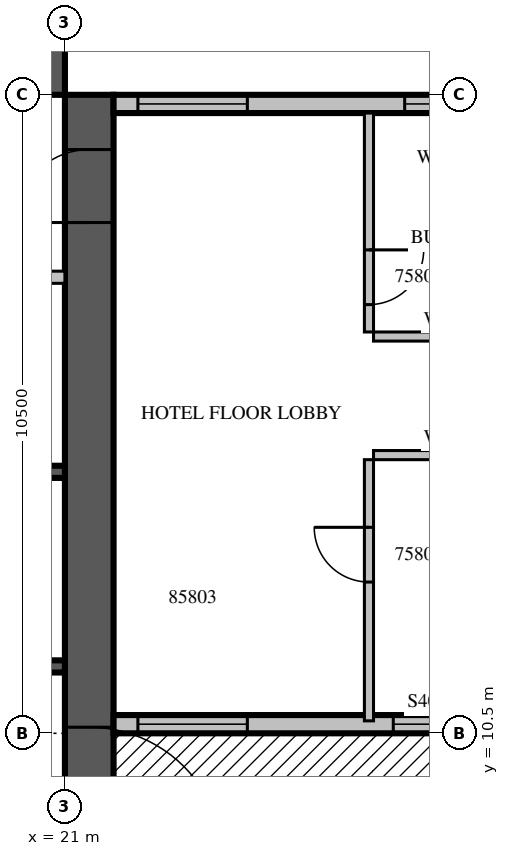
"""IFC4 building model, lengths in metres.
Left out: names, types, materials, properties, quantities, classifications, styles, units other than length and angle.
Written with IfcOpenShell. Run it as: python <this file> out.ifc"""

import sys

from ifc_helpers import new_model, si_unit, direction, frame, frame_2d, origin, place, context, subcontext, project, spatial, rectangle, extrude, source, transform, mapped, element, fill, save


model = new_model("IFC4")
c1 = context("Model", 3, precision=1e-05, world=origin(), true_north=direction((0.0, 1.0)))
c2 = subcontext(c1, "Body", "Model", "MODEL_VIEW")
j1 = project(units=[si_unit("LENGTHUNIT", "METRE"), si_unit("PLANEANGLEUNIT", "RADIAN")], contexts=[c1])
p1 = place(None, origin())
s1 = spatial("IfcSite", under=j1, at=p1, CompositionType="ELEMENT")
p2 = place(p1, origin())
s2 = spatial("IfcBuilding", under=s1, at=p2, CompositionType="ELEMENT")
p3 = place(p2, frame((0.0, 0.0, 253.8)))
s3 = spatial("IfcBuildingStorey", under=s2, at=p3, CompositionType="ELEMENT", Elevation=253.8)
m1 = source(origin(), c2, "Body", "SweptSolid", [
    extrude(rectangle(XDim=16.8, YDim=0.8, at=frame_2d((8.4, 0.0))), origin(), (0.0, 0.0, 1.0), 3.8),
])
p4 = place(p3, frame((21.4, 4.2, 0.0), z_axis=(0.0, 0.0, 1.0), x_axis=(0.0, 1.0, 0.0)))
e1 = element("IfcWall", 1, at=p4, inside=s3, PredefinedType="SHEAR", context=c2, shape_type="MappedRepresentation", body=[
    mapped(m1, transform((0.0, 0.0, 0.0), scale=1.0)),
])
m2 = source(origin(), c2, "Body", "SweptSolid", [
    extrude(rectangle(XDim=2.2, YDim=2.1, at=frame_2d((1.1, 1.05))), frame((0.0, 0.41, 0.0), z_axis=(0.0, -1.0, 0.0), x_axis=(1.0, 0.0, 0.0)), (0.0, 0.0, 1.0), 0.82),
])
p5 = place(p4, frame((4.2, 0.0, 0.0)))
e2 = element("IfcOpeningElement", 2, at=p5, cuts=e1, PredefinedType="OPENING", context=c2, shape_type="MappedRepresentation", body=[
    mapped(m2, transform((0.0, 0.0, 0.0), scale=1.0)),
])
m3 = source(origin(), c2, "Body", "SweptSolid", [
    extrude(rectangle(XDim=1.2, YDim=2.1, at=frame_2d((0.6, 1.05))), frame((0.0, 0.41, 0.0), z_axis=(0.0, -1.0, 0.0), x_axis=(1.0, 0.0, 0.0)), (0.0, 0.0, 1.0), 0.82),
])
p6 = place(p4, frame((14.7, 0.0, 0.0)))
e3 = element("IfcOpeningElement", 3, at=p6, cuts=e1, PredefinedType="OPENING", context=c2, shape_type="MappedRepresentation", body=[
    mapped(m3, transform((0.0, 0.0, 0.0), scale=1.0)),
])
p7 = place(p3, frame((4.2, 21.4, 0.0), z_axis=(0.0, 0.0, 1.0), x_axis=(1.0, 0.0, 0.0)))
e4 = element("IfcWall", 4, at=p7, inside=s3, PredefinedType="SHEAR", context=c2, shape_type="MappedRepresentation", body=[
    mapped(m1, transform((0.0, 0.0, 0.0), scale=1.0)),
])
p8 = place(p7, frame((6.2, 0.0, 0.0)))
e5 = element("IfcOpeningElement", 5, at=p8, cuts=e4, PredefinedType="OPENING", context=c2, shape_type="MappedRepresentation", body=[
    mapped(m3, transform((0.0, 0.0, 0.0), scale=1.0)),
])
m4 = source(origin(), c2, "Body", "SweptSolid", [
    extrude(rectangle(XDim=7.2, YDim=0.3, at=frame_2d((3.6, 0.0))), origin(), (0.0, 0.0, 1.0), 3.4),
])
p9 = place(p3, frame((21.8, 10.65, 0.0), z_axis=(0.0, 0.0, 1.0), x_axis=(1.0, 0.0, 0.0)))
e6 = element("IfcWall", 6, at=p9, inside=s3, PredefinedType="STANDARD", context=c2, shape_type="MappedRepresentation", body=[
    mapped(m4, transform((0.0, 0.0, 0.0), scale=1.0)),
])
m5 = source(origin(), c2, "Body", "SweptSolid", [
    extrude(rectangle(XDim=1.8, YDim=2.4, at=frame_2d((0.9, 1.2))), frame((0.0, 0.16, 0.0), z_axis=(0.0, -1.0, 0.0), x_axis=(1.0, 0.0, 0.0)), (0.0, 0.0, 1.0), 0.32),
])
p10 = place(p9, frame((0.4, 0.0, 0.0)))
e7 = element("IfcOpeningElement", 7, at=p10, cuts=e6, PredefinedType="OPENING", context=c2, shape_type="MappedRepresentation", body=[
    mapped(m5, transform((0.0, 0.0, 0.0), scale=1.0)),
])
p11 = place(p9, frame((4.6, 0.0, 0.0)))
e8 = element("IfcOpeningElement", 8, at=p11, cuts=e6, PredefinedType="OPENING", context=c2, shape_type="MappedRepresentation", body=[
    mapped(m5, transform((0.0, 0.0, 0.0), scale=1.0)),
])
p12 = place(p3, frame((29.0, 20.85, 0.0), z_axis=(0.0, 0.0, 1.0), x_axis=(-1.0, 0.0, 0.0)))
e9 = element("IfcWall", 9, at=p12, inside=s3, PredefinedType="STANDARD", context=c2, shape_type="MappedRepresentation", body=[
    mapped(m4, transform((0.0, 0.0, 0.0), scale=1.0)),
])
m6 = source(origin(), c2, "Body", "SweptSolid", [
    extrude(rectangle(XDim=1.8, YDim=2.3, at=frame_2d((0.9, 1.15))), frame((0.0, 0.16, 0.0), z_axis=(0.0, -1.0, 0.0), x_axis=(1.0, 0.0, 0.0)), (0.0, 0.0, 1.0), 0.32),
])
p13 = place(p12, frame((0.613, 0.0, 0.6)))
e10 = element("IfcOpeningElement", 10, at=p13, cuts=e9, PredefinedType="OPENING", context=c2, shape_type="MappedRepresentation", body=[
    mapped(m6, transform((0.0, 0.0, 0.0), scale=1.0)),
])
p14 = place(p12, frame((5.0, 0.0, 0.6)))
e11 = element("IfcOpeningElement", 11, at=p14, cuts=e9, PredefinedType="OPENING", context=c2, shape_type="MappedRepresentation", body=[
    mapped(m6, transform((0.0, 0.0, 0.0), scale=1.0)),
])
m7 = source(origin(), c2, "Body", "SweptSolid", [
    extrude(rectangle(XDim=9.6, YDim=0.2, at=frame_2d((4.8, 0.0))), origin(), (0.0, 0.0, 1.0), 3.8),
])
p15 = place(p3, frame((11.4, 11.6, 0.0), z_axis=(0.0, 0.0, 1.0), x_axis=(1.0, 0.0, 0.0)))
e12 = element("IfcWall", 12, at=p15, inside=s3, PredefinedType="SOLIDWALL", context=c2, shape_type="MappedRepresentation", body=[
    mapped(m7, transform((0.0, 0.0, 0.0), scale=1.0)),
])
p16 = place(p3, frame((11.4, 14.8, 0.0), z_axis=(0.0, 0.0, 1.0), x_axis=(1.0, 0.0, 0.0)))
e13 = element("IfcWall", 13, at=p16, inside=s3, PredefinedType="SOLIDWALL", context=c2, shape_type="MappedRepresentation", body=[
    mapped(m7, transform((0.0, 0.0, 0.0), scale=1.0)),
])
m8 = source(origin(), c2, "Body", "SweptSolid", [
    extrude(rectangle(XDim=1.1, YDim=2.1, at=frame_2d((0.55, 1.05))), frame((0.0, 0.11, 0.0), z_axis=(0.0, -1.0, 0.0), x_axis=(1.0, 0.0, 0.0)), (0.0, 0.0, 1.0), 0.22),
])
p17 = place(p16, frame((3.05, 0.0, 0.0)))
e14 = element("IfcOpeningElement", 14, at=p17, cuts=e13, PredefinedType="OPENING", context=c2, shape_type="MappedRepresentation", body=[
    mapped(m8, transform((0.0, 0.0, 0.0), scale=1.0)),
])
p18 = place(p16, frame((5.45, 0.0, 0.0)))
e15 = element("IfcOpeningElement", 15, at=p18, cuts=e13, PredefinedType="OPENING", context=c2, shape_type="MappedRepresentation", body=[
    mapped(m8, transform((0.0, 0.0, 0.0), scale=1.0)),
])
p19 = place(p16, frame((7.85, 0.0, 0.0)))
e16 = element("IfcOpeningElement", 16, at=p19, cuts=e13, PredefinedType="OPENING", context=c2, shape_type="MappedRepresentation", body=[
    mapped(m8, transform((0.0, 0.0, 0.0), scale=1.0)),
])
m9 = source(origin(), c2, "Body", "SweptSolid", [
    extrude(rectangle(XDim=11.45, YDim=0.2, at=frame_2d((5.725, 0.0))), origin(), (0.0, 0.0, 1.0), 3.4),
])
p20 = place(p3, frame((9.55, 18.0, 0.0), z_axis=(0.0, 0.0, 1.0), x_axis=(1.0, 0.0, 0.0)))
e17 = element("IfcWall", 17, at=p20, inside=s3, PredefinedType="PARTITIONING", context=c2, shape_type="MappedRepresentation", body=[
    mapped(m9, transform((0.0, 0.0, 0.0), scale=1.0)),
])
m10 = source(origin(), c2, "Body", "SweptSolid", [
    extrude(rectangle(XDim=0.9, YDim=2.1, at=frame_2d((0.45, 1.05))), frame((0.0, 0.11, 0.0), z_axis=(0.0, -1.0, 0.0), x_axis=(1.0, 0.0, 0.0)), (0.0, 0.0, 1.0), 0.22),
])
p21 = place(p20, frame((0.725, 0.0, 0.0)))
e18 = element("IfcOpeningElement", 18, at=p21, cuts=e17, PredefinedType="OPENING", context=c2, shape_type="MappedRepresentation", body=[
    mapped(m10, transform((0.0, 0.0, 0.0), scale=1.0)),
])
p22 = place(p20, frame((2.775, 0.0, 0.0)))
e19 = element("IfcOpeningElement", 19, at=p22, cuts=e17, PredefinedType="OPENING", context=c2, shape_type="MappedRepresentation", body=[
    mapped(m10, transform((0.0, 0.0, 0.0), scale=1.0)),
])
p23 = place(p20, frame((7.35, 0.0, 0.0)))
e20 = element("IfcOpeningElement", 20, at=p23, cuts=e17, PredefinedType="OPENING", context=c2, shape_type="MappedRepresentation", body=[
    mapped(m8, transform((0.0, 0.0, 0.0), scale=1.0)),
])
m11 = source(origin(), c2, "Body", "SweptSolid", [
    extrude(rectangle(XDim=4.295, YDim=0.15, at=frame_2d((2.147, 0.0))), origin(), (0.0, 0.0, 1.0), 3.4),
])
p24 = place(p3, frame((26.0, 15.0, 0.0), z_axis=(0.0, 0.0, 1.0), x_axis=(0.0, -1.0, 0.0)))
e21 = element("IfcWall", 21, at=p24, inside=s3, PredefinedType="PARTITIONING", context=c2, shape_type="MappedRepresentation", body=[
    mapped(m11, transform((0.0, 0.0, 0.0), scale=1.0)),
])
m12 = source(origin(), c2, "Body", "SweptSolid", [
    extrude(rectangle(XDim=0.9, YDim=2.1, at=frame_2d((0.45, 1.05))), frame((0.0, 0.085, 0.0), z_axis=(0.0, -1.0, 0.0), x_axis=(1.0, 0.0, 0.0)), (0.0, 0.0, 1.0), 0.17),
])
p25 = place(p24, frame((1.113, 0.0, 0.0)))
e22 = element("IfcOpeningElement", 22, at=p25, cuts=e21, PredefinedType="OPENING", context=c2, shape_type="MappedRepresentation", body=[
    mapped(m12, transform((0.0, 0.0, 0.0), scale=1.0)),
])
m13 = source(origin(), c2, "Body", "SweptSolid", [
    extrude(rectangle(XDim=3.6, YDim=0.15, at=frame_2d((1.8, 0.0))), origin(), (0.0, 0.0, 1.0), 3.4),
])
p26 = place(p3, frame((26.0, 20.7, 0.0), z_axis=(0.0, 0.0, 1.0), x_axis=(0.0, -1.0, 0.0)))
e23 = element("IfcWall", 23, at=p26, inside=s3, PredefinedType="PARTITIONING", context=c2, shape_type="MappedRepresentation", body=[
    mapped(m13, transform((0.0, 0.0, 0.0), scale=1.0)),
])
p27 = place(p26, frame((2.25, 0.0, 0.0)))
e24 = element("IfcOpeningElement", 24, at=p27, cuts=e23, PredefinedType="OPENING", context=c2, shape_type="MappedRepresentation", body=[
    mapped(m12, transform((0.0, 0.0, 0.0), scale=1.0)),
])
m14 = source(origin(), c2, "Body", "SweptSolid", [
    extrude(rectangle(XDim=3.25, YDim=0.15, at=frame_2d((1.625, 0.0))), origin(), (0.0, 0.0, 1.0), 3.4),
])
for number, where, z_axis, x_axis in (
    (25, (29.325, 15.075, 0.0), (0.0, 0.0, 1.0), (-1.0, 0.0, 0.0)),
    (26, (26.075, 17.025, 0.0), (0.0, 0.0, 1.0), (1.0, 0.0, 0.0)),
):
    element("IfcWall", number, at=place(p3, frame(where, z_axis=z_axis, x_axis=x_axis)), inside=s3, PredefinedType="PARTITIONING", context=c2, shape_type="MappedRepresentation", body=[
        mapped(m14, transform((0.0, 0.0, 0.0), scale=1.0)),
    ])
m15 = source(origin(), c2, "Body", "SweptSolid", [
    extrude(rectangle(XDim=1.8, YDim=2.4, at=frame_2d((0.9, 1.2))), frame((0.0, 0.025, 0.0), z_axis=(0.0, -1.0, 0.0), x_axis=(1.0, 0.0, 0.0)), (0.0, 0.0, 1.0), 0.05),
])
p28 = place(p10, origin())
e27 = element("IfcDoor", 27, at=p28, inside=s3, OperationType="SLIDING_TO_LEFT", PredefinedType="DOOR", context=c2, shape_type="MappedRepresentation", body=[
    mapped(m15, transform((0.0, 0.0, 0.0), scale=1.0)),
])
fill(e7, e27)
p29 = place(p11, origin())
e28 = element("IfcDoor", 28, at=p29, inside=s3, OperationType="SLIDING_TO_LEFT", PredefinedType="DOOR", context=c2, shape_type="MappedRepresentation", body=[
    mapped(m15, transform((0.0, 0.0, 0.0), scale=1.0)),
])
fill(e8, e28)
m16 = source(origin(), c2, "Body", "SweptSolid", [
    extrude(rectangle(XDim=1.8, YDim=2.3, at=frame_2d((0.9, 1.15))), frame((0.0, 0.03, 0.0), z_axis=(0.0, -1.0, 0.0), x_axis=(1.0, 0.0, 0.0)), (0.0, 0.0, 1.0), 0.06),
])
p30 = place(p13, origin())
e29 = element("IfcWindow", 29, at=p30, inside=s3, PartitioningType="SINGLE_PANEL", PredefinedType="WINDOW", context=c2, shape_type="MappedRepresentation", body=[
    mapped(m16, transform((0.0, 0.0, 0.0), scale=1.0)),
])
fill(e10, e29)
p31 = place(p14, origin())
e30 = element("IfcWindow", 30, at=p31, inside=s3, PartitioningType="SINGLE_PANEL", PredefinedType="WINDOW", context=c2, shape_type="MappedRepresentation", body=[
    mapped(m16, transform((0.0, 0.0, 0.0), scale=1.0)),
])
fill(e11, e30)
m17 = source(origin(), c2, "Body", "SweptSolid", [
    extrude(rectangle(XDim=2.2, YDim=2.1, at=frame_2d((1.1, 1.05))), frame((0.0, 0.025, 0.0), z_axis=(0.0, -1.0, 0.0), x_axis=(1.0, 0.0, 0.0)), (0.0, 0.0, 1.0), 0.05),
])
p32 = place(p5, origin())
e31 = element("IfcDoor", 31, at=p32, inside=s3, OperationType="DOUBLE_DOOR_SINGLE_SWING", PredefinedType="DOOR", context=c2, shape_type="MappedRepresentation", body=[
    mapped(m17, transform((0.0, 0.0, 0.0), scale=1.0)),
])
fill(e2, e31)
m18 = source(origin(), c2, "Body", "SweptSolid", [
    extrude(rectangle(XDim=1.2, YDim=2.1, at=frame_2d((0.6, 1.05))), frame((0.0, 0.025, 0.0), z_axis=(0.0, -1.0, 0.0), x_axis=(1.0, 0.0, 0.0)), (0.0, 0.0, 1.0), 0.05),
])
p33 = place(p6, origin())
e32 = element("IfcDoor", 32, at=p33, inside=s3, OperationType="SINGLE_SWING_LEFT", PredefinedType="DOOR", context=c2, shape_type="MappedRepresentation", body=[
    mapped(m18, transform((0.0, 0.0, 0.0), scale=1.0)),
])
fill(e3, e32)
m19 = source(origin(), c2, "Body", "SweptSolid", [
    extrude(rectangle(XDim=0.9, YDim=2.1, at=frame_2d((0.45, 1.05))), frame((0.0, 0.025, 0.0), z_axis=(0.0, -1.0, 0.0), x_axis=(1.0, 0.0, 0.0)), (0.0, 0.0, 1.0), 0.05),
])
p34 = place(p25, origin())
e33 = element("IfcDoor", 33, at=p34, inside=s3, OperationType="SINGLE_SWING_RIGHT", PredefinedType="DOOR", context=c2, shape_type="MappedRepresentation", body=[
    mapped(m19, transform((0.0, 0.0, 0.0), scale=1.0)),
])
fill(e22, e33)
p35 = place(p27, origin())
e34 = element("IfcDoor", 34, at=p35, inside=s3, OperationType="SINGLE_SWING_LEFT", PredefinedType="DOOR", context=c2, shape_type="MappedRepresentation", body=[
    mapped(m19, transform((0.0, 0.0, 0.0), scale=1.0)),
])
fill(e24, e34)
save(model, sys.argv[1])
